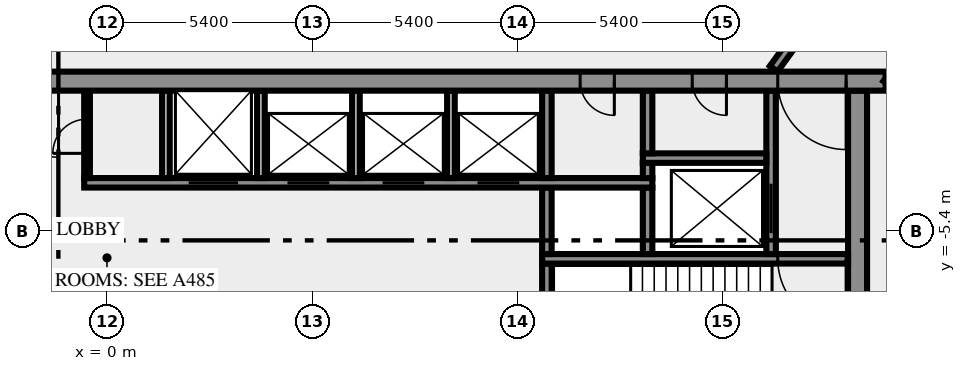
"""IFC4 building model, lengths in metres.
Left out: names, types, materials, properties, quantities, classifications, styles, units other than length and angle.
Written with IfcOpenShell. Run it as: python <this file> out.ifc"""

import sys

from ifc_helpers import new_model, si_unit, direction, frame, frame_2d, origin, place, context, subcontext, project, spatial, rectangle, extrude, element, fill, save


model = new_model("IFC4")
c1 = context("Model", 3, precision=1e-05, world=origin(), true_north=direction((0.0, 1.0)))
c2 = subcontext(c1, "Body", "Model", "MODEL_VIEW")
j1 = project(units=[si_unit("LENGTHUNIT", "METRE"), si_unit("PLANEANGLEUNIT", "RADIAN")], contexts=[c1])
p1 = place(None, origin())
s1 = spatial("IfcSite", under=j1, at=p1, CompositionType="ELEMENT")
p2 = place(p1, origin())
s2 = spatial("IfcBuilding", under=s1, at=p2, CompositionType="ELEMENT")
p3 = place(p2, frame((0.0, 0.0, 172.0)))
s3 = spatial("IfcBuildingStorey", under=s2, at=p3, CompositionType="ELEMENT", Elevation=172.0)
p4 = place(p3, frame((19.75, -10.5, 0.0), z_axis=(0.0, 0.0, 1.0), x_axis=(0.0, 1.0, 0.0)))
e1 = element("IfcWall", 1, at=p4, inside=s3, PredefinedType="SHEAR", context=c2, shape_type="SweptSolid", body=[
    extrude(rectangle(XDim=8.8, YDim=0.5, at=frame_2d((4.4, 0.0))), origin(), (0.0, 0.0, 1.0), 3.65),
])
p5 = place(p3, frame((11.575, -7.25, 0.0), z_axis=(0.0, 0.0, 1.0), x_axis=(0.0, 1.0, 0.0)))
e2 = element("IfcWall", 2, at=p5, inside=s3, PredefinedType="SHEAR", context=c2, shape_type="SweptSolid", body=[
    extrude(rectangle(XDim=1.0, YDim=0.25, at=frame_2d((0.5, 0.0))), origin(), (0.0, 0.0, 1.0), 3.65),
])
p6 = place(p3, frame((19.5, -6.125, 0.0), z_axis=(0.0, 0.0, 1.0), x_axis=(-1.0, 0.0, 0.0)))
e3 = element("IfcWall", 3, at=p6, inside=s3, PredefinedType="SHEAR", context=c2, shape_type="SweptSolid", body=[
    extrude(rectangle(XDim=8.05, YDim=0.25, at=frame_2d((4.025, 0.0))), origin(), (0.0, 0.0, 1.0), 3.65),
])
p7 = place(p6, frame((0.05, 0.0, 0.0)))
e4 = element("IfcOpeningElement", 4, at=p7, cuts=e3, PredefinedType="OPENING", context=c2, shape_type="SweptSolid", body=[
    extrude(rectangle(XDim=1.8, YDim=2.1, at=frame_2d((0.9, 1.05))), frame((0.0, 0.135, 0.0), z_axis=(0.0, -1.0, 0.0), x_axis=(1.0, 0.0, 0.0)), (0.0, 0.0, 1.0), 0.27),
])
for number, where, z_axis, x_axis in (
    (5, (11.575, -6.0, 0.0), (0.0, 0.0, 1.0), (0.0, 1.0, 0.0)),
    (6, (14.225, -6.0, 0.0), (0.0, 0.0, 1.0), (0.0, 1.0, 0.0)),
):
    element("IfcWall", number, at=place(p3, frame(where, z_axis=z_axis, x_axis=x_axis)), inside=s3, PredefinedType="SHEAR", context=c2, shape_type="SweptSolid", body=[
        extrude(rectangle(XDim=1.75, YDim=0.25, at=frame_2d((0.875, 0.0))), origin(), (0.0, 0.0, 1.0), 3.65),
    ])
p8 = place(p3, frame((17.475, -6.0, 0.0), z_axis=(0.0, 0.0, 1.0), x_axis=(0.0, 1.0, 0.0)))
e7 = element("IfcWall", 7, at=p8, inside=s3, PredefinedType="SHEAR", context=c2, shape_type="SweptSolid", body=[
    extrude(rectangle(XDim=4.3, YDim=0.25, at=frame_2d((2.15, 0.0))), origin(), (0.0, 0.0, 1.0), 3.65),
])
p9 = place(p8, frame((0.55, 0.0, 0.0)))
e8 = element("IfcOpeningElement", 8, at=p9, cuts=e7, PredefinedType="OPENING", context=c2, shape_type="SweptSolid", body=[
    extrude(rectangle(XDim=1.3, YDim=2.1, at=frame_2d((0.65, 1.05))), frame((0.0, 0.135, 0.0), z_axis=(0.0, -1.0, 0.0), x_axis=(1.0, 0.0, 0.0)), (0.0, 0.0, 1.0), 0.27),
])
p10 = place(p3, frame((-0.6, -4.125, 0.0), z_axis=(0.0, 0.0, 1.0), x_axis=(1.0, 0.0, 0.0)))
e9 = element("IfcWall", 9, at=p10, inside=s3, PredefinedType="SHEAR", context=c2, shape_type="SweptSolid", body=[
    extrude(rectangle(XDim=14.95, YDim=0.25, at=frame_2d((7.475, 0.0))), origin(), (0.0, 0.0, 1.0), 3.65),
])
p11 = place(p10, frame((2.75, 0.0, 0.0)))
e10 = element("IfcOpeningElement", 10, at=p11, cuts=e9, PredefinedType="OPENING", context=c2, shape_type="SweptSolid", body=[
    extrude(rectangle(XDim=1.3, YDim=2.1, at=frame_2d((0.65, 1.05))), frame((0.0, 0.135, 0.0), z_axis=(0.0, -1.0, 0.0), x_axis=(1.0, 0.0, 0.0)), (0.0, 0.0, 1.0), 0.27),
])
p12 = place(p10, frame((5.35, 0.0, 0.0)))
e11 = element("IfcOpeningElement", 11, at=p12, cuts=e9, PredefinedType="OPENING", context=c2, shape_type="SweptSolid", body=[
    extrude(rectangle(XDim=1.1, YDim=2.1, at=frame_2d((0.55, 1.05))), frame((0.0, 0.135, 0.0), z_axis=(0.0, -1.0, 0.0), x_axis=(1.0, 0.0, 0.0)), (0.0, 0.0, 1.0), 0.27),
])
p13 = place(p10, frame((7.85, 0.0, 0.0)))
e12 = element("IfcOpeningElement", 12, at=p13, cuts=e9, PredefinedType="OPENING", context=c2, shape_type="SweptSolid", body=[
    extrude(rectangle(XDim=1.1, YDim=2.1, at=frame_2d((0.55, 1.05))), frame((0.0, 0.135, 0.0), z_axis=(0.0, -1.0, 0.0), x_axis=(1.0, 0.0, 0.0)), (0.0, 0.0, 1.0), 0.27),
])
p14 = place(p10, frame((10.35, 0.0, 0.0)))
e13 = element("IfcOpeningElement", 13, at=p14, cuts=e9, PredefinedType="OPENING", context=c2, shape_type="SweptSolid", body=[
    extrude(rectangle(XDim=1.1, YDim=2.1, at=frame_2d((0.55, 1.05))), frame((0.0, 0.135, 0.0), z_axis=(0.0, -1.0, 0.0), x_axis=(1.0, 0.0, 0.0)), (0.0, 0.0, 1.0), 0.27),
])
p15 = place(p3, frame((-0.525, -4.0, 0.0), z_axis=(0.0, 0.0, 1.0), x_axis=(0.0, 1.0, 0.0)))
e14 = element("IfcWall", 14, at=p15, inside=s3, PredefinedType="PARTITIONING", context=c2, shape_type="SweptSolid", body=[
    extrude(rectangle(XDim=2.3, YDim=0.15, at=frame_2d((1.15, 0.0))), origin(), (0.0, 0.0, 1.0), 3.65),
])
p16 = place(p15, frame((0.65, 0.0, 0.0)))
e15 = element("IfcOpeningElement", 15, at=p16, cuts=e14, PredefinedType="OPENING", context=c2, shape_type="SweptSolid", body=[
    extrude(rectangle(XDim=0.9, YDim=2.1, at=frame_2d((0.45, 1.05))), frame((0.0, 0.085, 0.0), z_axis=(0.0, -1.0, 0.0), x_axis=(1.0, 0.0, 0.0)), (0.0, 0.0, 1.0), 0.17),
])
for number, where, z_axis, x_axis in (
    (16, (1.55, -4.0, 0.0), (0.0, 0.0, 1.0), (0.0, 1.0, 0.0)),
    (17, (4.05, -4.0, 0.0), (0.0, 0.0, 1.0), (0.0, 1.0, 0.0)),
    (18, (6.55, -4.0, 0.0), (0.0, 0.0, 1.0), (0.0, 1.0, 0.0)),
    (19, (9.05, -4.0, 0.0), (0.0, 0.0, 1.0), (0.0, 1.0, 0.0)),
):
    element("IfcWall", number, at=place(p3, frame(where, z_axis=z_axis, x_axis=x_axis)), inside=s3, PredefinedType="SOLIDWALL", context=c2, shape_type="SweptSolid", body=[
        extrude(rectangle(XDim=2.3, YDim=0.2, at=frame_2d((1.15, 0.0))), origin(), (0.0, 0.0, 1.0), 3.65),
    ])
p17 = place(p3, frame((11.575, -4.0, 0.0), z_axis=(0.0, 0.0, 1.0), x_axis=(0.0, 1.0, 0.0)))
e20 = element("IfcWall", 20, at=p17, inside=s3, PredefinedType="SHEAR", context=c2, shape_type="SweptSolid", body=[
    extrude(rectangle(XDim=2.3, YDim=0.25, at=frame_2d((1.15, 0.0))), origin(), (0.0, 0.0, 1.0), 3.65),
])
p18 = place(p3, frame((14.225, -4.0, 0.0), z_axis=(0.0, 0.0, 1.0), x_axis=(0.0, 1.0, 0.0)))
e21 = element("IfcWall", 21, at=p18, inside=s3, PredefinedType="SHEAR", context=c2, shape_type="SweptSolid", body=[
    extrude(rectangle(XDim=0.4, YDim=0.25, at=frame_2d((0.2, 0.0))), origin(), (0.0, 0.0, 1.0), 3.65),
])
p19 = place(p3, frame((14.1, -3.475, 0.0), z_axis=(0.0, 0.0, 1.0), x_axis=(1.0, 0.0, 0.0)))
e22 = element("IfcWall", 22, at=p19, inside=s3, PredefinedType="SHEAR", context=c2, shape_type="SweptSolid", body=[
    extrude(rectangle(XDim=3.25, YDim=0.25, at=frame_2d((1.625, 0.0))), origin(), (0.0, 0.0, 1.0), 3.65),
])
p20 = place(p3, frame((14.225, -3.35, 0.0), z_axis=(0.0, 0.0, 1.0), x_axis=(0.0, 1.0, 0.0)))
e23 = element("IfcWall", 23, at=p20, inside=s3, PredefinedType="SHEAR", context=c2, shape_type="SweptSolid", body=[
    extrude(rectangle(XDim=1.65, YDim=0.25, at=frame_2d((0.825, 0.0))), origin(), (0.0, 0.0, 1.0), 3.65),
])
p21 = place(p3, frame((20.49, -1.45, 0.0), z_axis=(0.0, 0.0, 1.0), x_axis=(-1.0, 0.0, 0.0)))
e24 = element("IfcWall", 24, at=p21, inside=s3, PredefinedType="SHEAR", context=c2, shape_type="SweptSolid", body=[
    extrude(rectangle(XDim=40.98, YDim=0.5, at=frame_2d((20.49, 0.0))), origin(), (0.0, 0.0, 1.0), 3.65),
])
p22 = place(p21, frame((38.14, 0.0, 0.0)))
e25 = element("IfcOpeningElement", 25, at=p22, cuts=e24, PredefinedType="OPENING", context=c2, shape_type="SweptSolid", body=[
    extrude(rectangle(XDim=1.8, YDim=2.1, at=frame_2d((0.9, 1.05))), frame((0.0, 0.26, 0.0), z_axis=(0.0, -1.0, 0.0), x_axis=(1.0, 0.0, 0.0)), (0.0, 0.0, 1.0), 0.52),
])
p23 = place(p21, frame((36.728, 0.0, 0.0)))
e26 = element("IfcOpeningElement", 26, at=p23, cuts=e24, PredefinedType="OPENING", context=c2, shape_type="SweptSolid", body=[
    extrude(rectangle(XDim=0.8, YDim=2.1, at=frame_2d((0.4, 1.05))), frame((0.0, 0.26, 0.0), z_axis=(0.0, -1.0, 0.0), x_axis=(1.0, 0.0, 0.0)), (0.0, 0.0, 1.0), 0.52),
])
p24 = place(p21, frame((35.153, 0.0, 0.0)))
e27 = element("IfcOpeningElement", 27, at=p24, cuts=e24, PredefinedType="OPENING", context=c2, shape_type="SweptSolid", body=[
    extrude(rectangle(XDim=0.8, YDim=2.1, at=frame_2d((0.4, 1.05))), frame((0.0, 0.26, 0.0), z_axis=(0.0, -1.0, 0.0), x_axis=(1.0, 0.0, 0.0)), (0.0, 0.0, 1.0), 0.52),
])
p25 = place(p21, frame((32.94, 0.0, 0.0)))
e28 = element("IfcOpeningElement", 28, at=p25, cuts=e24, PredefinedType="OPENING", context=c2, shape_type="SweptSolid", body=[
    extrude(rectangle(XDim=0.9, YDim=2.1, at=frame_2d((0.45, 1.05))), frame((0.0, 0.26, 0.0), z_axis=(0.0, -1.0, 0.0), x_axis=(1.0, 0.0, 0.0)), (0.0, 0.0, 1.0), 0.52),
])
p26 = place(p21, frame((27.84, 0.0, 0.0)))
e29 = element("IfcOpeningElement", 29, at=p26, cuts=e24, PredefinedType="OPENING", context=c2, shape_type="SweptSolid", body=[
    extrude(rectangle(XDim=0.9, YDim=2.1, at=frame_2d((0.45, 1.05))), frame((0.0, 0.26, 0.0), z_axis=(0.0, -1.0, 0.0), x_axis=(1.0, 0.0, 0.0)), (0.0, 0.0, 1.0), 0.52),
])
p27 = place(p21, frame((21.765, 0.0, 0.0)))
e30 = element("IfcOpeningElement", 30, at=p27, cuts=e24, PredefinedType="OPENING", context=c2, shape_type="SweptSolid", body=[
    extrude(rectangle(XDim=2.0, YDim=2.1, at=frame_2d((1.0, 1.05))), frame((0.0, 0.26, 0.0), z_axis=(0.0, -1.0, 0.0), x_axis=(1.0, 0.0, 0.0)), (0.0, 0.0, 1.0), 0.52),
])
p28 = place(p21, frame((7.14, 0.0, 0.0)))
e31 = element("IfcOpeningElement", 31, at=p28, cuts=e24, PredefinedType="OPENING", context=c2, shape_type="SweptSolid", body=[
    extrude(rectangle(XDim=0.9, YDim=2.1, at=frame_2d((0.45, 1.05))), frame((0.0, 0.26, 0.0), z_axis=(0.0, -1.0, 0.0), x_axis=(1.0, 0.0, 0.0)), (0.0, 0.0, 1.0), 0.52),
])
p29 = place(p21, frame((4.19, 0.0, 0.0)))
e32 = element("IfcOpeningElement", 32, at=p29, cuts=e24, PredefinedType="OPENING", context=c2, shape_type="SweptSolid", body=[
    extrude(rectangle(XDim=0.9, YDim=2.1, at=frame_2d((0.45, 1.05))), frame((0.0, 0.26, 0.0), z_axis=(0.0, -1.0, 0.0), x_axis=(1.0, 0.0, 0.0)), (0.0, 0.0, 1.0), 0.52),
])
p30 = place(p21, frame((1.04, 0.0, 0.0)))
e33 = element("IfcOpeningElement", 33, at=p30, cuts=e24, PredefinedType="OPENING", context=c2, shape_type="SweptSolid", body=[
    extrude(rectangle(XDim=1.8, YDim=2.1, at=frame_2d((0.9, 1.05))), frame((0.0, 0.26, 0.0), z_axis=(0.0, -1.0, 0.0), x_axis=(1.0, 0.0, 0.0)), (0.0, 0.0, 1.0), 0.52),
])
p31 = place(p3, frame((17.545, -1.125, 0.0), z_axis=(0.0, 0.0, 1.0), x_axis=(0.587786330937, 0.809016210693, 0.0)))
e34 = element("IfcWall", 34, at=p31, inside=s3, PredefinedType="SOLIDWALL", context=c2, shape_type="SweptSolid", body=[
    extrude(rectangle(XDim=30.103, YDim=0.25, at=frame_2d((15.052, 0.0))), origin(), (0.0, 0.0, 1.0), 3.65),
])
p32 = place(p31, frame((3.441, 0.0, 0.0)))
e35 = element("IfcOpeningElement", 35, at=p32, cuts=e34, PredefinedType="OPENING", context=c2, shape_type="SweptSolid", body=[
    extrude(rectangle(XDim=0.9, YDim=2.1, at=frame_2d((0.45, 1.05))), frame((0.0, 0.135, 0.0), z_axis=(0.0, -1.0, 0.0), x_axis=(1.0, 0.0, 0.0)), (0.0, 0.0, 1.0), 0.27),
])
p33 = place(p31, frame((23.158, 0.0, 0.0)))
e36 = element("IfcOpeningElement", 36, at=p33, cuts=e34, PredefinedType="OPENING", context=c2, shape_type="SweptSolid", body=[
    extrude(rectangle(XDim=0.9, YDim=2.1, at=frame_2d((0.45, 1.05))), frame((0.0, 0.135, 0.0), z_axis=(0.0, -1.0, 0.0), x_axis=(1.0, 0.0, 0.0)), (0.0, 0.0, 1.0), 0.27),
])
p34 = place(p31, frame((21.558, 0.0, 0.0)))
e37 = element("IfcOpeningElement", 37, at=p34, cuts=e34, PredefinedType="OPENING", context=c2, shape_type="SweptSolid", body=[
    extrude(rectangle(XDim=0.9, YDim=2.1, at=frame_2d((0.45, 1.05))), frame((0.0, 0.135, 0.0), z_axis=(0.0, -1.0, 0.0), x_axis=(1.0, 0.0, 0.0)), (0.0, 0.0, 1.0), 0.27),
])
p35 = place(p3, frame((37.236, 21.469, 0.0), z_axis=(0.0, 0.0, 1.0), x_axis=(-0.58778344073, -0.809018310549, 0.0)))
e38 = element("IfcWall", 38, at=p35, inside=s3, PredefinedType="SOLIDWALL", context=c2, shape_type="SweptSolid", body=[
    extrude(rectangle(XDim=28.42, YDim=0.25, at=frame_2d((14.21, 0.0))), origin(), (0.0, 0.0, 1.0), 3.65),
])
p36 = place(p35, frame((13.205, 0.0, 0.0)))
e39 = element("IfcOpeningElement", 39, at=p36, cuts=e38, PredefinedType="OPENING", context=c2, shape_type="SweptSolid", body=[
    extrude(rectangle(XDim=1.2, YDim=2.1, at=frame_2d((0.6, 1.05))), frame((0.0, 0.135, 0.0), z_axis=(0.0, -1.0, 0.0), x_axis=(1.0, 0.0, 0.0)), (0.0, 0.0, 1.0), 0.27),
])
p37 = place(p35, frame((0.224, 0.0, 0.0)))
e40 = element("IfcOpeningElement", 40, at=p37, cuts=e38, PredefinedType="OPENING", context=c2, shape_type="SweptSolid", body=[
    extrude(rectangle(XDim=0.9, YDim=2.1, at=frame_2d((0.45, 1.05))), frame((0.0, 0.135, 0.0), z_axis=(0.0, -1.0, 0.0), x_axis=(1.0, 0.0, 0.0)), (0.0, 0.0, 1.0), 0.27),
])
p38 = place(p7, origin())
e41 = element("IfcDoor", 41, at=p38, inside=s3, OperationType="DOUBLE_DOOR_SINGLE_SWING", PredefinedType="DOOR", context=c2, shape_type="SweptSolid", body=[
    extrude(rectangle(XDim=1.8, YDim=2.1, at=frame_2d((0.9, 1.05))), frame((0.0, 0.025, 0.0), z_axis=(0.0, -1.0, 0.0), x_axis=(1.0, 0.0, 0.0)), (0.0, 0.0, 1.0), 0.05),
])
fill(e4, e41)
p39 = place(p9, origin())
e42 = element("IfcDoor", 42, at=p39, inside=s3, OperationType="DOUBLE_DOOR_SLIDING", PredefinedType="DOOR", context=c2, shape_type="SweptSolid", body=[
    extrude(rectangle(XDim=1.3, YDim=2.1, at=frame_2d((0.65, 1.05))), frame((0.0, 0.025, 0.0), z_axis=(0.0, -1.0, 0.0), x_axis=(1.0, 0.0, 0.0)), (0.0, 0.0, 1.0), 0.05),
])
fill(e8, e42)
p40 = place(p11, origin())
e43 = element("IfcDoor", 43, at=p40, inside=s3, OperationType="DOUBLE_DOOR_SLIDING", PredefinedType="DOOR", context=c2, shape_type="SweptSolid", body=[
    extrude(rectangle(XDim=1.3, YDim=2.1, at=frame_2d((0.65, 1.05))), frame((0.0, 0.025, 0.0), z_axis=(0.0, -1.0, 0.0), x_axis=(1.0, 0.0, 0.0)), (0.0, 0.0, 1.0), 0.05),
])
fill(e10, e43)
p41 = place(p12, origin())
e44 = element("IfcDoor", 44, at=p41, inside=s3, OperationType="DOUBLE_DOOR_SLIDING", PredefinedType="DOOR", context=c2, shape_type="SweptSolid", body=[
    extrude(rectangle(XDim=1.1, YDim=2.1, at=frame_2d((0.55, 1.05))), frame((0.0, 0.025, 0.0), z_axis=(0.0, -1.0, 0.0), x_axis=(1.0, 0.0, 0.0)), (0.0, 0.0, 1.0), 0.05),
])
fill(e11, e44)
p42 = place(p13, origin())
e45 = element("IfcDoor", 45, at=p42, inside=s3, OperationType="DOUBLE_DOOR_SLIDING", PredefinedType="DOOR", context=c2, shape_type="SweptSolid", body=[
    extrude(rectangle(XDim=1.1, YDim=2.1, at=frame_2d((0.55, 1.05))), frame((0.0, 0.025, 0.0), z_axis=(0.0, -1.0, 0.0), x_axis=(1.0, 0.0, 0.0)), (0.0, 0.0, 1.0), 0.05),
])
fill(e12, e45)
p43 = place(p14, origin())
e46 = element("IfcDoor", 46, at=p43, inside=s3, OperationType="DOUBLE_DOOR_SLIDING", PredefinedType="DOOR", context=c2, shape_type="SweptSolid", body=[
    extrude(rectangle(XDim=1.1, YDim=2.1, at=frame_2d((0.55, 1.05))), frame((0.0, 0.025, 0.0), z_axis=(0.0, -1.0, 0.0), x_axis=(1.0, 0.0, 0.0)), (0.0, 0.0, 1.0), 0.05),
])
fill(e13, e46)
p44 = place(p16, origin())
e47 = element("IfcDoor", 47, at=p44, inside=s3, OperationType="SINGLE_SWING_LEFT", PredefinedType="DOOR", context=c2, shape_type="SweptSolid", body=[
    extrude(rectangle(XDim=0.9, YDim=2.1, at=frame_2d((0.45, 1.05))), frame((0.0, 0.025, 0.0), z_axis=(0.0, -1.0, 0.0), x_axis=(1.0, 0.0, 0.0)), (0.0, 0.0, 1.0), 0.05),
])
fill(e15, e47)
p45 = place(p27, origin())
e48 = element("IfcDoor", 48, at=p45, inside=s3, OperationType="DOUBLE_DOOR_SINGLE_SWING", PredefinedType="DOOR", context=c2, shape_type="SweptSolid", body=[
    extrude(rectangle(XDim=2.0, YDim=2.1, at=frame_2d((1.0, 1.05))), frame((0.0, 0.025, 0.0), z_axis=(0.0, -1.0, 0.0), x_axis=(1.0, 0.0, 0.0)), (0.0, 0.0, 1.0), 0.05),
])
fill(e30, e48)
p46 = place(p28, origin())
e49 = element("IfcDoor", 49, at=p46, inside=s3, OperationType="SINGLE_SWING_LEFT", PredefinedType="DOOR", context=c2, shape_type="SweptSolid", body=[
    extrude(rectangle(XDim=0.9, YDim=2.1, at=frame_2d((0.45, 1.05))), frame((0.0, 0.025, 0.0), z_axis=(0.0, -1.0, 0.0), x_axis=(1.0, 0.0, 0.0)), (0.0, 0.0, 1.0), 0.05),
])
fill(e31, e49)
p47 = place(p29, origin())
e50 = element("IfcDoor", 50, at=p47, inside=s3, OperationType="SINGLE_SWING_LEFT", PredefinedType="DOOR", context=c2, shape_type="SweptSolid", body=[
    extrude(rectangle(XDim=0.9, YDim=2.1, at=frame_2d((0.45, 1.05))), frame((0.0, 0.025, 0.0), z_axis=(0.0, -1.0, 0.0), x_axis=(1.0, 0.0, 0.0)), (0.0, 0.0, 1.0), 0.05),
])
fill(e32, e50)
p48 = place(p30, origin())
e51 = element("IfcDoor", 51, at=p48, inside=s3, OperationType="DOUBLE_DOOR_SINGLE_SWING", PredefinedType="DOOR", context=c2, shape_type="SweptSolid", body=[
    extrude(rectangle(XDim=1.8, YDim=2.1, at=frame_2d((0.9, 1.05))), frame((0.0, 0.025, 0.0), z_axis=(0.0, -1.0, 0.0), x_axis=(1.0, 0.0, 0.0)), (0.0, 0.0, 1.0), 0.05),
])
fill(e33, e51)
save(model, sys.argv[1])
